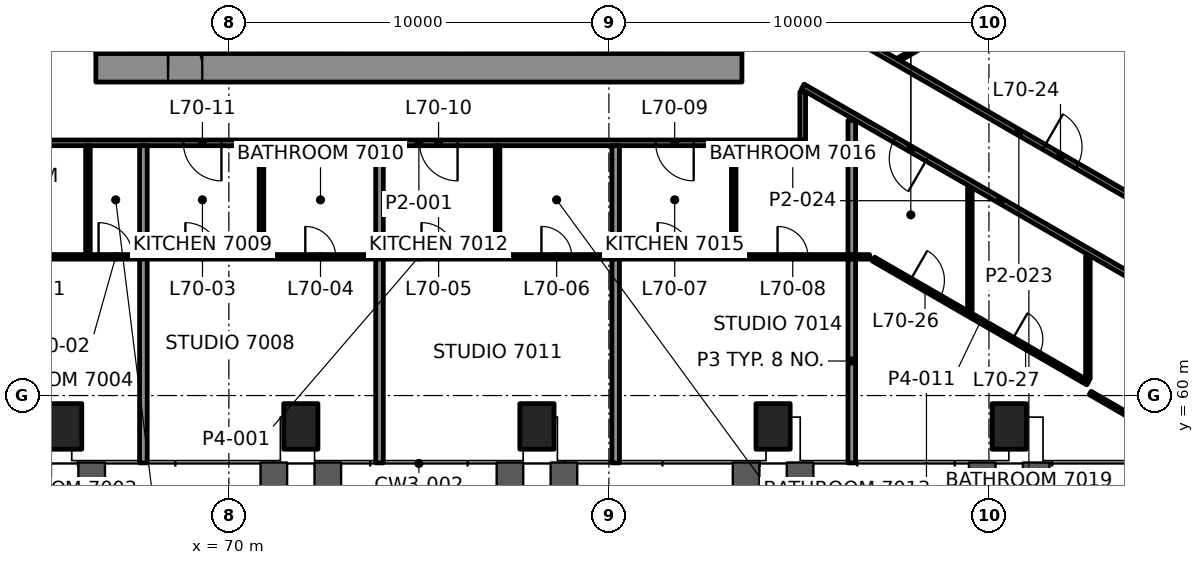
"""IFC4 building model, lengths in metres.
Left out: names, types, materials, properties, quantities, classifications, styles, units other than length and angle.
Written with IfcOpenShell. Run it as: python <this file> out.ifc"""

import sys

from ifc_helpers import new_model, si_unit, direction, frame, frame_2d, origin, origin_2d, place, context, subcontext, project, spatial, rectangle, hollow_rectangle, extrude, element, fill, save


model = new_model("IFC4")
c1 = context("Model", 3, precision=1e-05, world=origin(), true_north=direction((0.0, 1.0)))
c2 = subcontext(c1, "Body", "Model", "MODEL_VIEW")
j1 = project(units=[si_unit("LENGTHUNIT", "METRE"), si_unit("PLANEANGLEUNIT", "RADIAN")], contexts=[c1])
p1 = place(None, origin())
s1 = spatial("IfcSite", under=j1, at=p1, CompositionType="ELEMENT")
p2 = place(p1, origin())
s2 = spatial("IfcBuilding", under=s1, at=p2, CompositionType="ELEMENT")
p3 = place(p2, frame((0.0, 0.0, 291.6)))
s3 = spatial("IfcBuildingStorey", under=s2, at=p3, CompositionType="ELEMENT", Elevation=291.6)
for number, where, z_axis, x_axis in (
    (1, (65.68, 59.188, -0.0), (0.0, 0.0, 1.0), (1.0, 0.0, 0.0)),
    (2, (71.893, 59.188, -0.0), (0.0, 0.0, 1.0), (1.0, 0.0, 0.0)),
    (3, (78.107, 59.188, -0.0), (0.0, 0.0, 1.0), (1.0, 0.0, 0.0)),
    (4, (84.32, 59.188, -0.0), (0.0, 0.0, 1.0), (1.0, 0.0, 0.0)),
    (5, (90.533, 59.188, -0.0), (0.0, 0.0, 1.0), (1.0, 0.0, 0.0)),
):
    element("IfcColumn", number, at=place(p3, frame(where, z_axis=z_axis, x_axis=x_axis)), inside=s3, PredefinedType="COLUMN", context=c2, shape_type="SweptSolid", body=[
        extrude(hollow_rectangle(XDim=0.9, YDim=1.2, WallThickness=0.06, at=origin_2d()), origin(), (0.0, 0.0, 1.0), 3.5),
    ])
p4 = place(p3, frame((66.5, 68.625, 0.0), z_axis=(0.0, 0.0, 1.0), x_axis=(1.0, 0.0, 0.0)))
e6 = element("IfcWall", 6, at=p4, inside=s3, PredefinedType="SHEAR", context=c2, shape_type="SweptSolid", body=[
    extrude(rectangle(XDim=17.0, YDim=0.75, at=frame_2d((8.5, 0.0))), origin(), (0.0, 0.0, 1.0), 3.3),
])
p5 = place(p4, frame((1.9, 0.0, 0.0)))
e7 = element("IfcOpeningElement", 7, at=p5, cuts=e6, PredefinedType="OPENING", context=c2, shape_type="SweptSolid", body=[
    extrude(rectangle(XDim=0.9, YDim=2.1, at=frame_2d((0.45, 1.05))), frame((0.0, 0.385, 0.0), z_axis=(0.0, -1.0, 0.0), x_axis=(1.0, 0.0, 0.0)), (0.0, 0.0, 1.0), 0.77),
])
p6 = place(p3, frame((66.875, 69.0, 0.0), z_axis=(0.0, 0.0, 1.0), x_axis=(0.0, 1.0, 0.0)))
e8 = element("IfcWall", 8, at=p6, inside=s3, PredefinedType="SHEAR", context=c2, shape_type="SweptSolid", body=[
    extrude(rectangle(XDim=12.0, YDim=0.75, at=frame_2d((6.0, 0.0))), origin(), (0.0, 0.0, 1.0), 3.3),
])
p7 = place(p6, frame((3.7, 0.0, 0.0)))
e9 = element("IfcOpeningElement", 9, at=p7, cuts=e8, PredefinedType="OPENING", context=c2, shape_type="SweptSolid", body=[
    extrude(rectangle(XDim=1.2, YDim=2.1, at=frame_2d((0.6, 1.05))), frame((0.0, 0.385, 0.0), z_axis=(0.0, -1.0, 0.0), x_axis=(1.0, 0.0, 0.0)), (0.0, 0.0, 1.0), 0.77),
])
p8 = place(p3, frame((83.125, 69.0, 0.0), z_axis=(0.0, 0.0, 1.0), x_axis=(0.0, 1.0, 0.0)))
e10 = element("IfcWall", 10, at=p8, inside=s3, PredefinedType="SHEAR", context=c2, shape_type="SweptSolid", body=[
    extrude(rectangle(XDim=12.0, YDim=0.75, at=frame_2d((6.0, 0.0))), origin(), (0.0, 0.0, 1.0), 3.3),
])
p9 = place(p8, frame((3.4, 0.0, 0.0)))
e11 = element("IfcOpeningElement", 11, at=p9, cuts=e10, PredefinedType="OPENING", context=c2, shape_type="SweptSolid", body=[
    extrude(rectangle(XDim=1.8, YDim=2.1, at=frame_2d((0.9, 1.05))), frame((0.0, 0.385, 0.0), z_axis=(0.0, -1.0, 0.0), x_axis=(1.0, 0.0, 0.0)), (0.0, 0.0, 1.0), 0.77),
])
for number, where, z_axis, x_axis in (
    (12, (70.45, 69.0, 0.0), (0.0, 0.0, 1.0), (0.0, 1.0, 0.0)),
    (13, (73.25, 69.0, 0.0), (0.0, 0.0, 1.0), (0.0, 1.0, 0.0)),
    (14, (76.05, 69.0, 0.0), (0.0, 0.0, 1.0), (0.0, 1.0, 0.0)),
    (15, (78.85, 69.0, 0.0), (0.0, 0.0, 1.0), (0.0, 1.0, 0.0)),
    (16, (81.65, 69.0, 0.0), (0.0, 0.0, 1.0), (0.0, 1.0, 0.0)),
):
    element("IfcWall", number, at=place(p3, frame(where, z_axis=z_axis, x_axis=x_axis)), inside=s3, PredefinedType="SHEAR", context=c2, shape_type="SweptSolid", body=[
        extrude(rectangle(XDim=2.6, YDim=0.3, at=frame_2d((1.3, 0.0))), origin(), (0.0, 0.0, 1.0), 3.3),
    ])
p10 = place(p3, frame((63.141, 63.65, 0.0), z_axis=(0.0, 0.0, 1.0), x_axis=(1.0, 0.0, 0.0)))
e17 = element("IfcWall", 17, at=p10, inside=s3, PredefinedType="PARTITIONING", context=c2, shape_type="SweptSolid", body=[
    extrude(rectangle(XDim=23.718, YDim=0.12, at=frame_2d((11.859, 0.0))), origin(), (0.0, 0.0, 1.0), 2.7),
])
p11 = place(p10, frame((1.276, 0.0, 0.0)))
e18 = element("IfcOpeningElement", 18, at=p11, cuts=e17, PredefinedType="OPENING", context=c2, shape_type="SweptSolid", body=[
    extrude(rectangle(XDim=0.8, YDim=2.1, at=frame_2d((0.4, 1.05))), frame((0.0, 0.07, 0.0), z_axis=(0.0, -1.0, 0.0), x_axis=(1.0, 0.0, 0.0)), (0.0, 0.0, 1.0), 0.14),
])
p12 = place(p10, frame((3.43, 0.0, 0.0)))
e19 = element("IfcOpeningElement", 19, at=p12, cuts=e17, PredefinedType="OPENING", context=c2, shape_type="SweptSolid", body=[
    extrude(rectangle(XDim=0.9, YDim=2.1, at=frame_2d((0.45, 1.05))), frame((0.0, 0.07, 0.0), z_axis=(0.0, -1.0, 0.0), x_axis=(1.0, 0.0, 0.0)), (0.0, 0.0, 1.0), 0.14),
])
p13 = place(p10, frame((5.715, 0.0, 0.0)))
e20 = element("IfcOpeningElement", 20, at=p13, cuts=e17, PredefinedType="OPENING", context=c2, shape_type="SweptSolid", body=[
    extrude(rectangle(XDim=0.9, YDim=2.1, at=frame_2d((0.45, 1.05))), frame((0.0, 0.07, 0.0), z_axis=(0.0, -1.0, 0.0), x_axis=(1.0, 0.0, 0.0)), (0.0, 0.0, 1.0), 0.14),
])
p14 = place(p10, frame((8.87, 0.0, 0.0)))
e21 = element("IfcOpeningElement", 21, at=p14, cuts=e17, PredefinedType="OPENING", context=c2, shape_type="SweptSolid", body=[
    extrude(rectangle(XDim=0.8, YDim=2.1, at=frame_2d((0.4, 1.05))), frame((0.0, 0.07, 0.0), z_axis=(0.0, -1.0, 0.0), x_axis=(1.0, 0.0, 0.0)), (0.0, 0.0, 1.0), 0.14),
])
p15 = place(p10, frame((11.928, 0.0, 0.0)))
e22 = element("IfcOpeningElement", 22, at=p15, cuts=e17, PredefinedType="OPENING", context=c2, shape_type="SweptSolid", body=[
    extrude(rectangle(XDim=0.9, YDim=2.1, at=frame_2d((0.45, 1.05))), frame((0.0, 0.07, 0.0), z_axis=(0.0, -1.0, 0.0), x_axis=(1.0, 0.0, 0.0)), (0.0, 0.0, 1.0), 0.14),
])
p16 = place(p10, frame((15.083, 0.0, 0.0)))
e23 = element("IfcOpeningElement", 23, at=p16, cuts=e17, PredefinedType="OPENING", context=c2, shape_type="SweptSolid", body=[
    extrude(rectangle(XDim=0.8, YDim=2.1, at=frame_2d((0.4, 1.05))), frame((0.0, 0.07, 0.0), z_axis=(0.0, -1.0, 0.0), x_axis=(1.0, 0.0, 0.0)), (0.0, 0.0, 1.0), 0.14),
])
p17 = place(p10, frame((18.141, 0.0, 0.0)))
e24 = element("IfcOpeningElement", 24, at=p17, cuts=e17, PredefinedType="OPENING", context=c2, shape_type="SweptSolid", body=[
    extrude(rectangle(XDim=0.9, YDim=2.1, at=frame_2d((0.45, 1.05))), frame((0.0, 0.07, 0.0), z_axis=(0.0, -1.0, 0.0), x_axis=(1.0, 0.0, 0.0)), (0.0, 0.0, 1.0), 0.14),
])
p18 = place(p10, frame((21.297, 0.0, 0.0)))
e25 = element("IfcOpeningElement", 25, at=p18, cuts=e17, PredefinedType="OPENING", context=c2, shape_type="SweptSolid", body=[
    extrude(rectangle(XDim=0.8, YDim=2.1, at=frame_2d((0.4, 1.05))), frame((0.0, 0.07, 0.0), z_axis=(0.0, -1.0, 0.0), x_axis=(1.0, 0.0, 0.0)), (0.0, 0.0, 1.0), 0.14),
])
p19 = place(p3, frame((85.1, 66.65, 0.0), z_axis=(0.0, 0.0, 1.0), x_axis=(-1.0, 0.0, 0.0)))
e26 = element("IfcWall", 26, at=p19, inside=s3, PredefinedType="PARTITIONING", context=c2, shape_type="SweptSolid", body=[
    extrude(rectangle(XDim=20.2, YDim=0.15, at=frame_2d((10.1, 0.0))), origin(), (0.0, 0.0, 1.0), 2.7),
])
p20 = place(p19, frame((2.869, 0.0, 0.0)))
e27 = element("IfcOpeningElement", 27, at=p20, cuts=e26, PredefinedType="OPENING", context=c2, shape_type="SweptSolid", body=[
    extrude(rectangle(XDim=1.0, YDim=2.1, at=frame_2d((0.5, 1.05))), frame((0.0, 0.085, 0.0), z_axis=(0.0, -1.0, 0.0), x_axis=(1.0, 0.0, 0.0)), (0.0, 0.0, 1.0), 0.17),
])
p21 = place(p19, frame((9.082, 0.0, 0.0)))
e28 = element("IfcOpeningElement", 28, at=p21, cuts=e26, PredefinedType="OPENING", context=c2, shape_type="SweptSolid", body=[
    extrude(rectangle(XDim=1.0, YDim=2.1, at=frame_2d((0.5, 1.05))), frame((0.0, 0.085, 0.0), z_axis=(0.0, -1.0, 0.0), x_axis=(1.0, 0.0, 0.0)), (0.0, 0.0, 1.0), 0.17),
])
p22 = place(p19, frame((15.296, 0.0, 0.0)))
e29 = element("IfcOpeningElement", 29, at=p22, cuts=e26, PredefinedType="OPENING", context=c2, shape_type="SweptSolid", body=[
    extrude(rectangle(XDim=1.0, YDim=2.1, at=frame_2d((0.5, 1.05))), frame((0.0, 0.085, 0.0), z_axis=(0.0, -1.0, 0.0), x_axis=(1.0, 0.0, 0.0)), (0.0, 0.0, 1.0), 0.17),
])
p23 = place(p3, frame((87.645, 68.855, 0.0), z_axis=(0.0, 0.0, 1.0), x_axis=(0.866023307551, 0.500003630766, 0.0)))
e30 = element("IfcWall", 30, at=p23, inside=s3, PredefinedType="PARTITIONING", context=c2, shape_type="SweptSolid", body=[
    extrude(rectangle(XDim=8.894, YDim=0.1, at=frame_2d((4.447, 0.0))), origin(), (0.0, 0.0, 1.0), 2.688),
])
p24 = place(p3, frame((92.604, 60.442, 0.0), z_axis=(0.0, 0.0, 1.0), x_axis=(0.0, 1.0, 0.0)))
e31 = element("IfcWall", 31, at=p24, inside=s3, PredefinedType="PARTITIONING", context=c2, shape_type="SweptSolid", body=[
    extrude(rectangle(XDim=3.228, YDim=0.12, at=frame_2d((1.614, 0.0))), origin(), (0.0, 0.0, 1.0), 2.7),
])
p25 = place(p3, frame((89.498, 62.236, 0.0), z_axis=(0.0, 0.0, 1.0), x_axis=(0.0, 1.0, 0.0)))
e32 = element("IfcWall", 32, at=p25, inside=s3, PredefinedType="PARTITIONING", context=c2, shape_type="SweptSolid", body=[
    extrude(rectangle(XDim=3.228, YDim=0.12, at=frame_2d((1.614, 0.0))), origin(), (0.0, 0.0, 1.0), 2.547),
])
p26 = place(p3, frame((86.391, 58.228, 0.0), z_axis=(0.0, 0.0, 1.0), x_axis=(0.0, 1.0, 0.0)))
e33 = element("IfcWall", 33, at=p26, inside=s3, PredefinedType="PARTITIONING", context=c2, shape_type="SweptSolid", body=[
    extrude(rectangle(XDim=5.363, YDim=0.2, at=frame_2d((2.681, 0.0))), origin(), (0.0, 0.0, 1.0), 2.7),
])
p27 = place(p3, frame((85.1, 66.725, 0.0), z_axis=(0.0, 0.0, 1.0), x_axis=(0.0, 1.0, 0.0)))
e34 = element("IfcWall", 34, at=p27, inside=s3, PredefinedType="PARTITIONING", context=c2, shape_type="SweptSolid", body=[
    extrude(rectangle(XDim=1.268, YDim=0.15, at=frame_2d((0.634, 0.0))), origin(), (0.0, 0.0, 1.0), 2.547),
])
p28 = place(p3, frame((83.284, 63.71, 0.0), z_axis=(0.0, 0.0, 1.0), x_axis=(0.0, 1.0, 0.0)))
e35 = element("IfcWall", 35, at=p28, inside=s3, PredefinedType="PARTITIONING", context=c2, shape_type="SweptSolid", body=[
    extrude(rectangle(XDim=2.865, YDim=0.12, at=frame_2d((1.433, 0.0))), origin(), (0.0, 0.0, 1.0), 2.7),
])
p29 = place(p3, frame((80.178, 58.228, 0.0), z_axis=(0.0, 0.0, 1.0), x_axis=(0.0, 1.0, 0.0)))
e36 = element("IfcWall", 36, at=p29, inside=s3, PredefinedType="PARTITIONING", context=c2, shape_type="SweptSolid", body=[
    extrude(rectangle(XDim=5.363, YDim=0.2, at=frame_2d((2.681, 0.0))), origin(), (0.0, 0.0, 1.0), 2.688),
])
p30 = place(p3, frame((77.071, 63.71, 0.0), z_axis=(0.0, 0.0, 1.0), x_axis=(0.0, 1.0, 0.0)))
e37 = element("IfcWall", 37, at=p30, inside=s3, PredefinedType="PARTITIONING", context=c2, shape_type="SweptSolid", body=[
    extrude(rectangle(XDim=2.865, YDim=0.12, at=frame_2d((1.433, 0.0))), origin(), (0.0, 0.0, 1.0), 2.7),
])
p31 = place(p3, frame((73.964, 58.228, 0.0), z_axis=(0.0, 0.0, 1.0), x_axis=(0.0, 1.0, 0.0)))
e38 = element("IfcWall", 38, at=p31, inside=s3, PredefinedType="PARTITIONING", context=c2, shape_type="SweptSolid", body=[
    extrude(rectangle(XDim=5.363, YDim=0.2, at=frame_2d((2.681, 0.0))), origin(), (0.0, 0.0, 1.0), 2.688),
])
p32 = place(p3, frame((70.858, 63.71, 0.0), z_axis=(0.0, 0.0, 1.0), x_axis=(0.0, 1.0, 0.0)))
e39 = element("IfcWall", 39, at=p32, inside=s3, PredefinedType="PARTITIONING", context=c2, shape_type="SweptSolid", body=[
    extrude(rectangle(XDim=2.865, YDim=0.12, at=frame_2d((1.433, 0.0))), origin(), (0.0, 0.0, 1.0), 2.7),
])
p33 = place(p3, frame((67.751, 58.228, 0.0), z_axis=(0.0, 0.0, 1.0), x_axis=(0.0, 1.0, 0.0)))
e40 = element("IfcWall", 40, at=p33, inside=s3, PredefinedType="PARTITIONING", context=c2, shape_type="SweptSolid", body=[
    extrude(rectangle(XDim=5.363, YDim=0.2, at=frame_2d((2.681, 0.0))), origin(), (0.0, 0.0, 1.0), 2.688),
])
p34 = place(p3, frame((66.292, 63.71, 0.0), z_axis=(0.0, 0.0, 1.0), x_axis=(0.0, 1.0, 0.0)))
e41 = element("IfcWall", 41, at=p34, inside=s3, PredefinedType="PARTITIONING", context=c2, shape_type="SweptSolid", body=[
    extrude(rectangle(XDim=2.865, YDim=0.12, at=frame_2d((1.433, 0.0))), origin(), (0.0, 0.0, 1.0), 2.7),
])
p35 = place(p3, frame((85.175, 70.165, 0.0), z_axis=(0.0, 0.0, 1.0), x_axis=(0.866023706001, -0.500002940635, 0.0)))
e42 = element("IfcWall", 42, at=p35, inside=s3, PredefinedType="PARTITIONING", context=c2, shape_type="SweptSolid", body=[
    extrude(rectangle(XDim=12.959, YDim=0.15, at=frame_2d((6.48, 0.0))), origin(), (0.0, 0.0, 1.0), 2.7),
])
p36 = place(p35, frame((7.246, 0.0, 0.0)))
e43 = element("IfcOpeningElement", 43, at=p36, cuts=e42, PredefinedType="OPENING", context=c2, shape_type="SweptSolid", body=[
    extrude(rectangle(XDim=1.0, YDim=2.1, at=frame_2d((0.5, 1.05))), frame((0.0, 0.085, 0.0), z_axis=(0.0, -1.0, 0.0), x_axis=(1.0, 0.0, 0.0)), (0.0, 0.0, 1.0), 0.17),
])
p37 = place(p3, frame((95.498, 62.126, 0.0), z_axis=(0.0, 0.0, 1.0), x_axis=(-0.866024746207, 0.500001138955, 0.0)))
e44 = element("IfcWall", 44, at=p37, inside=s3, PredefinedType="PARTITIONING", context=c2, shape_type="SweptSolid", body=[
    extrude(rectangle(XDim=12.007, YDim=0.15, at=frame_2d((6.003, 0.0))), origin(), (0.0, 0.0, 1.0), 2.547),
])
p38 = place(p37, frame((8.222, 0.0, 0.0)))
e45 = element("IfcOpeningElement", 45, at=p38, cuts=e44, PredefinedType="OPENING", context=c2, shape_type="SweptSolid", body=[
    extrude(rectangle(XDim=1.0, YDim=2.1, at=frame_2d((0.5, 1.05))), frame((0.0, 0.085, 0.0), z_axis=(0.0, -1.0, 0.0), x_axis=(1.0, 0.0, 0.0)), (0.0, 0.0, 1.0), 0.17),
])
p39 = place(p3, frame((86.963, 63.59, 0.0), z_axis=(0.0, 0.0, 1.0), x_axis=(0.866025198843, -0.500000354968, 0.0)))
e46 = element("IfcWall", 46, at=p39, inside=s3, PredefinedType="PARTITIONING", context=c2, shape_type="SweptSolid", body=[
    extrude(rectangle(XDim=6.515, YDim=0.12, at=frame_2d((3.257, 0.0))), origin(), (0.0, 0.0, 1.0), 2.7),
])
p40 = place(p39, frame((1.115, 0.0, 0.0)))
e47 = element("IfcOpeningElement", 47, at=p40, cuts=e46, PredefinedType="OPENING", context=c2, shape_type="SweptSolid", body=[
    extrude(rectangle(XDim=0.9, YDim=2.1, at=frame_2d((0.45, 1.05))), frame((0.0, 0.07, 0.0), z_axis=(0.0, -1.0, 0.0), x_axis=(1.0, 0.0, 0.0)), (0.0, 0.0, 1.0), 0.14),
])
p41 = place(p39, frame((4.221, 0.0, 0.0)))
e48 = element("IfcOpeningElement", 48, at=p41, cuts=e46, PredefinedType="OPENING", context=c2, shape_type="SweptSolid", body=[
    extrude(rectangle(XDim=0.8, YDim=2.1, at=frame_2d((0.4, 1.05))), frame((0.0, 0.07, 0.0), z_axis=(0.0, -1.0, 0.0), x_axis=(1.0, 0.0, 0.0)), (0.0, 0.0, 1.0), 0.14),
])
p42 = place(p3, frame((95.851, 58.228, 0.0), z_axis=(0.0, 0.0, 1.0), x_axis=(-0.866025356753, 0.50000008146, 0.0)))
e49 = element("IfcWall", 49, at=p42, inside=s3, PredefinedType="PARTITIONING", context=c2, shape_type="SweptSolid", body=[
    extrude(rectangle(XDim=3.679, YDim=0.1, at=frame_2d((1.84, 0.0))), origin(), (0.0, 0.0, 1.0), 2.7),
])
p43 = place(p3, frame((86.391, 63.71, 0.0), z_axis=(0.0, 0.0, 1.0), x_axis=(0.0, 1.0, 0.0)))
e50 = element("IfcWall", 50, at=p43, inside=s3, PredefinedType="PARTITIONING", context=c2, shape_type="SweptSolid", body=[
    extrude(rectangle(XDim=3.528, YDim=0.2, at=frame_2d((1.764, 0.0))), origin(), (0.0, 0.0, 1.0), 2.547),
])
for number, where, z_axis, x_axis in (
    (51, (80.178, 63.71, 0.0), (0.0, 0.0, 1.0), (0.0, 1.0, 0.0)),
    (52, (73.964, 63.71, 0.0), (0.0, 0.0, 1.0), (0.0, 1.0, 0.0)),
    (53, (67.751, 63.71, 0.0), (0.0, 0.0, 1.0), (0.0, 1.0, 0.0)),
):
    element("IfcWall", number, at=place(p3, frame(where, z_axis=z_axis, x_axis=x_axis)), inside=s3, PredefinedType="PARTITIONING", context=c2, shape_type="SweptSolid", body=[
        extrude(rectangle(XDim=2.865, YDim=0.2, at=frame_2d((1.433, 0.0))), origin(), (0.0, 0.0, 1.0), 2.7),
    ])
p44 = place(p3, frame((104.039, 65.027, 0.0), z_axis=(0.0, 0.0, 1.0), x_axis=(-0.499997313161, 0.866026955026, 0.0)))
e54 = element("IfcWall", 54, at=p44, inside=s3, PredefinedType="SOLIDWALL", context=c2, shape_type="SweptSolid", body=[
    extrude(rectangle(XDim=46.312, YDim=0.8, at=frame_2d((23.156, 0.0))), origin(), (0.0, 0.0, 1.0), 0.9),
])
p45 = place(p12, origin())
e55 = element("IfcDoor", 55, at=p45, inside=s3, OperationType="SINGLE_SWING_LEFT", PredefinedType="DOOR", context=c2, shape_type="SweptSolid", body=[
    extrude(rectangle(XDim=0.9, YDim=2.1, at=frame_2d((0.45, 1.05))), frame((0.0, 0.025, 0.0), z_axis=(0.0, -1.0, 0.0), x_axis=(1.0, 0.0, 0.0)), (0.0, 0.0, 1.0), 0.05),
])
fill(e19, e55)
p46 = place(p13, origin())
e56 = element("IfcDoor", 56, at=p46, inside=s3, OperationType="SINGLE_SWING_LEFT", PredefinedType="DOOR", context=c2, shape_type="SweptSolid", body=[
    extrude(rectangle(XDim=0.9, YDim=2.1, at=frame_2d((0.45, 1.05))), frame((0.0, 0.025, 0.0), z_axis=(0.0, -1.0, 0.0), x_axis=(1.0, 0.0, 0.0)), (0.0, 0.0, 1.0), 0.05),
])
fill(e20, e56)
p47 = place(p14, origin())
e57 = element("IfcDoor", 57, at=p47, inside=s3, OperationType="SINGLE_SWING_LEFT", PredefinedType="DOOR", context=c2, shape_type="SweptSolid", body=[
    extrude(rectangle(XDim=0.8, YDim=2.1, at=frame_2d((0.4, 1.05))), frame((0.0, 0.025, 0.0), z_axis=(0.0, -1.0, 0.0), x_axis=(1.0, 0.0, 0.0)), (0.0, 0.0, 1.0), 0.05),
])
fill(e21, e57)
p48 = place(p15, origin())
e58 = element("IfcDoor", 58, at=p48, inside=s3, OperationType="SINGLE_SWING_RIGHT", PredefinedType="DOOR", context=c2, shape_type="SweptSolid", body=[
    extrude(rectangle(XDim=0.9, YDim=2.1, at=frame_2d((0.45, 1.05))), frame((0.0, 0.025, 0.0), z_axis=(0.0, -1.0, 0.0), x_axis=(1.0, 0.0, 0.0)), (0.0, 0.0, 1.0), 0.05),
])
fill(e22, e58)
p49 = place(p16, origin())
e59 = element("IfcDoor", 59, at=p49, inside=s3, OperationType="SINGLE_SWING_RIGHT", PredefinedType="DOOR", context=c2, shape_type="SweptSolid", body=[
    extrude(rectangle(XDim=0.8, YDim=2.1, at=frame_2d((0.4, 1.05))), frame((0.0, 0.025, 0.0), z_axis=(0.0, -1.0, 0.0), x_axis=(1.0, 0.0, 0.0)), (0.0, 0.0, 1.0), 0.05),
])
fill(e23, e59)
p50 = place(p17, origin())
e60 = element("IfcDoor", 60, at=p50, inside=s3, OperationType="SINGLE_SWING_LEFT", PredefinedType="DOOR", context=c2, shape_type="SweptSolid", body=[
    extrude(rectangle(XDim=0.9, YDim=2.1, at=frame_2d((0.45, 1.05))), frame((0.0, 0.025, 0.0), z_axis=(0.0, -1.0, 0.0), x_axis=(1.0, 0.0, 0.0)), (0.0, 0.0, 1.0), 0.05),
])
fill(e24, e60)
p51 = place(p18, origin())
e61 = element("IfcDoor", 61, at=p51, inside=s3, OperationType="SINGLE_SWING_LEFT", PredefinedType="DOOR", context=c2, shape_type="SweptSolid", body=[
    extrude(rectangle(XDim=0.8, YDim=2.1, at=frame_2d((0.4, 1.05))), frame((0.0, 0.025, 0.0), z_axis=(0.0, -1.0, 0.0), x_axis=(1.0, 0.0, 0.0)), (0.0, 0.0, 1.0), 0.05),
])
fill(e25, e61)
p52 = place(p20, origin())
e62 = element("IfcDoor", 62, at=p52, inside=s3, OperationType="SINGLE_SWING_LEFT", PredefinedType="DOOR", context=c2, shape_type="SweptSolid", body=[
    extrude(rectangle(XDim=1.0, YDim=2.1, at=frame_2d((0.5, 1.05))), frame((0.0, 0.025, 0.0), z_axis=(0.0, -1.0, 0.0), x_axis=(1.0, 0.0, 0.0)), (0.0, 0.0, 1.0), 0.05),
])
fill(e27, e62)
p53 = place(p21, origin())
e63 = element("IfcDoor", 63, at=p53, inside=s3, OperationType="SINGLE_SWING_RIGHT", PredefinedType="DOOR", context=c2, shape_type="SweptSolid", body=[
    extrude(rectangle(XDim=1.0, YDim=2.1, at=frame_2d((0.5, 1.05))), frame((0.0, 0.025, 0.0), z_axis=(0.0, -1.0, 0.0), x_axis=(1.0, 0.0, 0.0)), (0.0, 0.0, 1.0), 0.05),
])
fill(e28, e63)
p54 = place(p22, origin())
e64 = element("IfcDoor", 64, at=p54, inside=s3, OperationType="SINGLE_SWING_LEFT", PredefinedType="DOOR", context=c2, shape_type="SweptSolid", body=[
    extrude(rectangle(XDim=1.0, YDim=2.1, at=frame_2d((0.5, 1.05))), frame((0.0, 0.025, 0.0), z_axis=(0.0, -1.0, 0.0), x_axis=(1.0, 0.0, 0.0)), (0.0, 0.0, 1.0), 0.05),
])
fill(e29, e64)
p55 = place(p36, origin())
e65 = element("IfcDoor", 65, at=p55, inside=s3, OperationType="SINGLE_SWING_RIGHT", PredefinedType="DOOR", context=c2, shape_type="SweptSolid", body=[
    extrude(rectangle(XDim=1.0, YDim=2.1, at=frame_2d((0.5, 1.05))), frame((0.0, 0.025, 0.0), z_axis=(0.0, -1.0, 0.0), x_axis=(1.0, 0.0, 0.0)), (0.0, 0.0, 1.0), 0.05),
])
fill(e43, e65)
p56 = place(p38, origin())
e66 = element("IfcDoor", 66, at=p56, inside=s3, OperationType="SINGLE_SWING_LEFT", PredefinedType="DOOR", context=c2, shape_type="SweptSolid", body=[
    extrude(rectangle(XDim=1.0, YDim=2.1, at=frame_2d((0.5, 1.05))), frame((0.0, 0.025, 0.0), z_axis=(0.0, -1.0, 0.0), x_axis=(1.0, 0.0, 0.0)), (0.0, 0.0, 1.0), 0.05),
])
fill(e45, e66)
p57 = place(p40, origin())
e67 = element("IfcDoor", 67, at=p57, inside=s3, OperationType="SINGLE_SWING_LEFT", PredefinedType="DOOR", context=c2, shape_type="SweptSolid", body=[
    extrude(rectangle(XDim=0.9, YDim=2.1, at=frame_2d((0.45, 1.05))), frame((0.0, 0.025, 0.0), z_axis=(0.0, -1.0, 0.0), x_axis=(1.0, 0.0, 0.0)), (0.0, 0.0, 1.0), 0.05),
])
fill(e47, e67)
p58 = place(p41, origin())
e68 = element("IfcDoor", 68, at=p58, inside=s3, OperationType="SINGLE_SWING_LEFT", PredefinedType="DOOR", context=c2, shape_type="SweptSolid", body=[
    extrude(rectangle(XDim=0.8, YDim=2.1, at=frame_2d((0.4, 1.05))), frame((0.0, 0.025, 0.0), z_axis=(0.0, -1.0, 0.0), x_axis=(1.0, 0.0, 0.0)), (0.0, 0.0, 1.0), 0.05),
])
fill(e48, e68)
p59 = place(p5, origin())
e69 = element("IfcDoor", 69, at=p59, inside=s3, OperationType="SINGLE_SWING_RIGHT", PredefinedType="DOOR", context=c2, shape_type="SweptSolid", body=[
    extrude(rectangle(XDim=0.9, YDim=2.1, at=frame_2d((0.45, 1.05))), frame((0.0, 0.095, 0.0), z_axis=(0.0, -1.0, 0.0), x_axis=(1.0, 0.0, 0.0)), (0.0, 0.0, 1.0), 0.19),
])
fill(e7, e69)
save(model, sys.argv[1])
